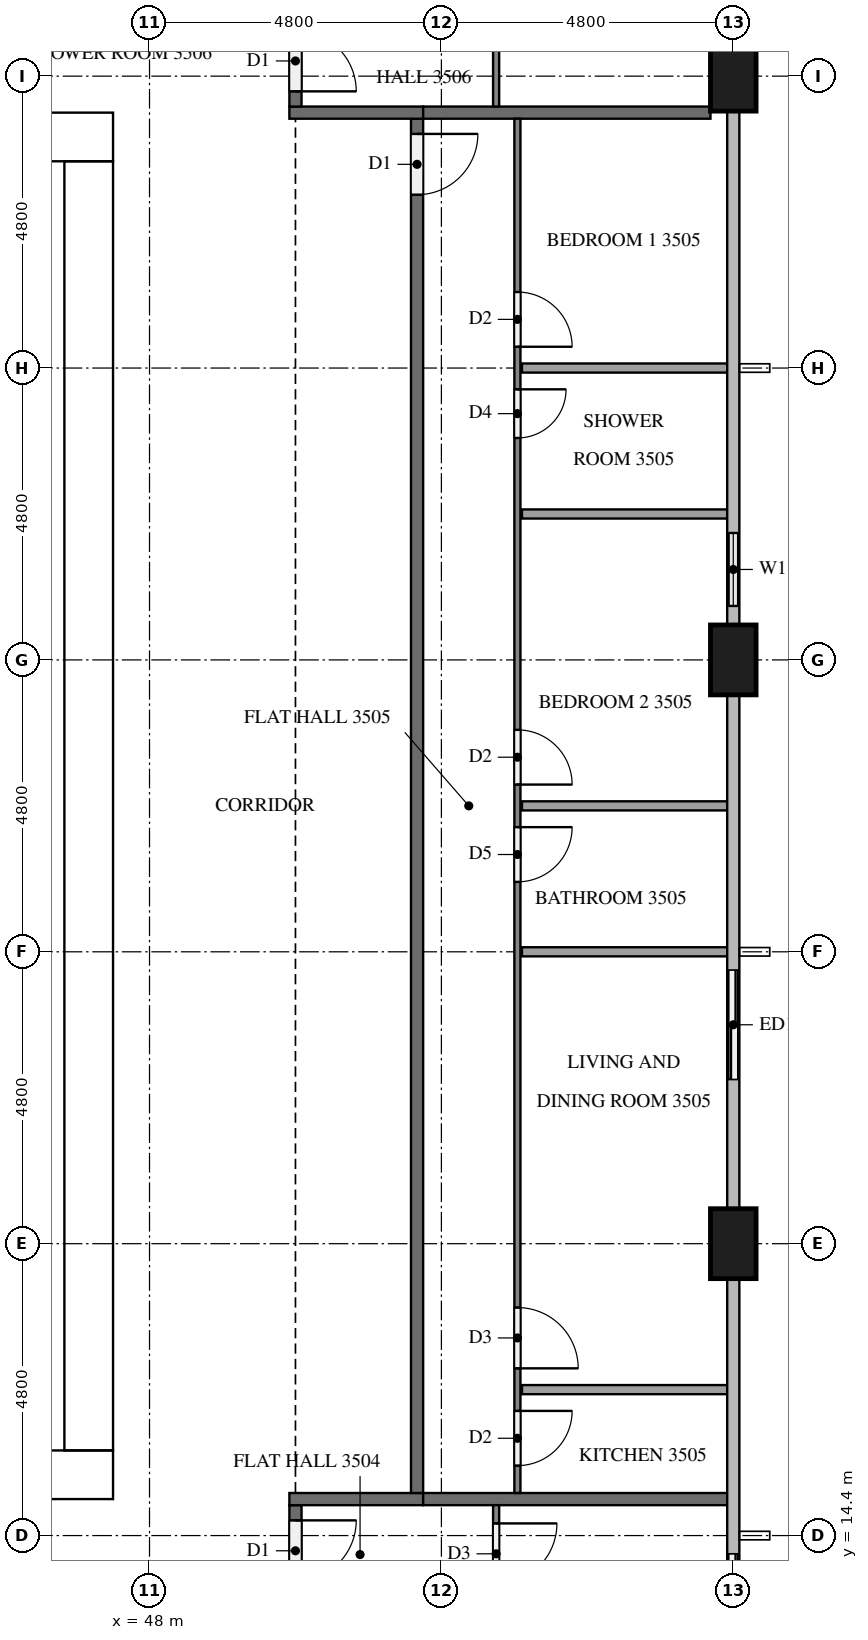
"""IFC4 building model, lengths in metres.
Left out: names, types, materials, properties, quantities, classifications, styles, units other than length and angle.
Written with IfcOpenShell. Run it as: python <this file> out.ifc"""

import sys

from ifc_helpers import new_model, si_unit, direction, frame, frame_2d, origin, origin_2d, place, context, subcontext, project, spatial, rectangle, extrude, element, fill, save


model = new_model("IFC4")
c1 = context("Model", 3, precision=1e-05, world=origin(), true_north=direction((0.0, 1.0)))
c2 = subcontext(c1, "Body", "Model", "MODEL_VIEW")
j1 = project(units=[si_unit("LENGTHUNIT", "METRE"), si_unit("PLANEANGLEUNIT", "RADIAN")], contexts=[c1])
p1 = place(None, origin())
s1 = spatial("IfcSite", under=j1, at=p1, CompositionType="ELEMENT")
p2 = place(p1, origin())
s2 = spatial("IfcBuilding", under=s1, at=p2, CompositionType="ELEMENT")
p3 = place(p2, frame((0.0, 0.0, 136.6)))
s3 = spatial("IfcBuildingStorey", under=s2, at=p3, CompositionType="ELEMENT", Elevation=136.6)
p4 = place(p3, frame((15.0, 15.4, 0.0), z_axis=(0.0, 0.0, 1.0), x_axis=(1.0, 0.0, 0.0)))
e1 = element("IfcWall", 1, at=p4, inside=s3, PredefinedType="SHEAR", context=c2, shape_type="SweptSolid", body=[
    extrude(rectangle(XDim=32.4, YDim=0.8, at=frame_2d((16.2, 0.0))), origin(), (0.0, 0.0, 1.0), 3.2),
])
p5 = place(p4, frame((15.3, 0.0, 0.0)))
e2 = element("IfcOpeningElement", 2, at=p5, cuts=e1, PredefinedType="OPENING", context=c2, shape_type="SweptSolid", body=[
    extrude(rectangle(XDim=1.8, YDim=2.1, at=frame_2d((0.9, 1.05))), frame((0.0, 0.41, 0.0), z_axis=(0.0, -1.0, 0.0), x_axis=(1.0, 0.0, 0.0)), (0.0, 0.0, 1.0), 0.82),
])
p6 = place(p3, frame((15.0, 37.4, 0.0), z_axis=(0.0, 0.0, 1.0), x_axis=(1.0, 0.0, 0.0)))
e3 = element("IfcWall", 3, at=p6, inside=s3, PredefinedType="SHEAR", context=c2, shape_type="SweptSolid", body=[
    extrude(rectangle(XDim=32.4, YDim=0.8, at=frame_2d((16.2, 0.0))), origin(), (0.0, 0.0, 1.0), 3.2),
])
p7 = place(p6, frame((15.3, 0.0, 0.0)))
e4 = element("IfcOpeningElement", 4, at=p7, cuts=e3, PredefinedType="OPENING", context=c2, shape_type="SweptSolid", body=[
    extrude(rectangle(XDim=1.8, YDim=2.1, at=frame_2d((0.9, 1.05))), frame((0.0, 0.41, 0.0), z_axis=(0.0, -1.0, 0.0), x_axis=(1.0, 0.0, 0.0)), (0.0, 0.0, 1.0), 0.82),
])
p8 = place(p6, frame((1.51, 0.0, 0.0)))
e5 = element("IfcOpeningElement", 5, at=p8, cuts=e3, PredefinedType="OPENING", context=c2, shape_type="SweptSolid", body=[
    extrude(rectangle(XDim=1.0, YDim=2.1, at=frame_2d((0.5, 1.05))), frame((0.0, 0.41, 0.0), z_axis=(0.0, -1.0, 0.0), x_axis=(1.0, 0.0, 0.0)), (0.0, 0.0, 1.0), 0.82),
])
p9 = place(p6, frame((5.11, 0.0, 0.0)))
e6 = element("IfcOpeningElement", 6, at=p9, cuts=e3, PredefinedType="OPENING", context=c2, shape_type="SweptSolid", body=[
    extrude(rectangle(XDim=1.0, YDim=2.1, at=frame_2d((0.5, 1.05))), frame((0.0, 0.41, 0.0), z_axis=(0.0, -1.0, 0.0), x_axis=(1.0, 0.0, 0.0)), (0.0, 0.0, 1.0), 0.82),
])
p10 = place(p3, frame((47.0, 15.8, 0.0), z_axis=(0.0, 0.0, 1.0), x_axis=(0.0, 1.0, 0.0)))
e7 = element("IfcWall", 7, at=p10, inside=s3, PredefinedType="SHEAR", context=c2, shape_type="SweptSolid", body=[
    extrude(rectangle(XDim=21.2, YDim=0.8, at=frame_2d((10.6, 0.0))), origin(), (0.0, 0.0, 1.0), 3.2),
])
p11 = place(p10, frame((10.3, 0.0, 0.0)))
e8 = element("IfcOpeningElement", 8, at=p11, cuts=e7, PredefinedType="OPENING", context=c2, shape_type="SweptSolid", body=[
    extrude(rectangle(XDim=1.2, YDim=2.1, at=frame_2d((0.6, 1.05))), frame((0.0, 0.41, 0.0), z_axis=(0.0, -1.0, 0.0), x_axis=(1.0, 0.0, 0.0)), (0.0, 0.0, 1.0), 0.82),
])
for number, where, z_axis, x_axis in (
    (9, (57.6, 19.2, 0.0), (0.0, 0.0, 1.0), (0.0, 1.0, 0.0)),
    (10, (57.6, 28.8, 0.0), (0.0, 0.0, 1.0), (0.0, 1.0, 0.0)),
    (11, (57.6, 38.4, 0.0), (0.0, 0.0, 1.0), (0.0, 1.0, 0.0)),
):
    element("IfcColumn", number, at=place(p3, frame(where, z_axis=z_axis, x_axis=x_axis)), inside=s3, PredefinedType="COLUMN", context=c2, shape_type="SweptSolid", body=[
        extrude(rectangle(XDim=1.15, YDim=0.75, at=origin_2d()), origin(), (0.0, 0.0, 1.0), 3.2),
    ])
p12 = place(p3, frame((57.6, 12.0, 0.0), z_axis=(0.0, 0.0, 1.0), x_axis=(0.0, 1.0, 0.0)))
e12 = element("IfcWall", 12, at=p12, inside=s3, PredefinedType="SOLIDWALL", context=c2, shape_type="SweptSolid", body=[
    extrude(rectangle(XDim=2.4, YDim=0.15, at=frame_2d((1.2, 0.0))), origin(), (0.0, 0.0, 1.0), 3.2),
])
p13 = place(p12, frame((0.3, 0.0, 0.0)))
e13 = element("IfcOpeningElement", 13, at=p13, cuts=e12, PredefinedType="OPENING", context=c2, shape_type="SweptSolid", body=[
    extrude(rectangle(XDim=1.8, YDim=2.4, at=frame_2d((0.9, 1.2))), frame((0.0, 0.085, 0.0), z_axis=(0.0, -1.0, 0.0), x_axis=(1.0, 0.0, 0.0)), (0.0, 0.0, 1.0), 0.17),
])
p14 = place(p3, frame((57.6, 21.6, 0.0), z_axis=(0.0, 0.0, 1.0), x_axis=(0.0, 1.0, 0.0)))
e14 = element("IfcWall", 14, at=p14, inside=s3, PredefinedType="SOLIDWALL", context=c2, shape_type="SweptSolid", body=[
    extrude(rectangle(XDim=2.4, YDim=0.15, at=frame_2d((1.2, 0.0))), origin(), (0.0, 0.0, 1.0), 3.2),
])
p15 = place(p14, frame((0.3, 0.0, 0.0)))
e15 = element("IfcOpeningElement", 15, at=p15, cuts=e14, PredefinedType="OPENING", context=c2, shape_type="SweptSolid", body=[
    extrude(rectangle(XDim=1.8, YDim=2.4, at=frame_2d((0.9, 1.2))), frame((0.0, 0.085, 0.0), z_axis=(0.0, -1.0, 0.0), x_axis=(1.0, 0.0, 0.0)), (0.0, 0.0, 1.0), 0.17),
])
p16 = place(p3, frame((57.6, 29.375, 0.0), z_axis=(0.0, 0.0, 1.0), x_axis=(0.0, 1.0, 0.0)))
e16 = element("IfcWall", 16, at=p16, inside=s3, PredefinedType="SOLIDWALL", context=c2, shape_type="SweptSolid", body=[
    extrude(rectangle(XDim=1.825, YDim=0.15, at=frame_2d((0.913, 0.0))), origin(), (0.0, 0.0, 1.0), 3.2),
])
p17 = place(p16, frame((0.312, 0.0, 0.9)))
e17 = element("IfcOpeningElement", 17, at=p17, cuts=e16, PredefinedType="OPENING", context=c2, shape_type="SweptSolid", body=[
    extrude(rectangle(XDim=1.2, YDim=1.4, at=frame_2d((0.6, 0.7))), frame((0.0, 0.085, 0.0), z_axis=(0.0, -1.0, 0.0), x_axis=(1.0, 0.0, 0.0)), (0.0, 0.0, 1.0), 0.17),
])
p18 = place(p3, frame((50.4, 14.9, 0.0), z_axis=(0.0, 0.0, 1.0), x_axis=(0.0, -1.0, 0.0)))
e18 = element("IfcWall", 18, at=p18, inside=s3, PredefinedType="PARTITIONING", context=c2, shape_type="SweptSolid", body=[
    extrude(rectangle(XDim=2.8, YDim=0.2, at=frame_2d((1.4, 0.0))), origin(), (0.0, 0.0, 1.0), 3.2),
])
p19 = place(p18, frame((0.25, 0.0, 0.0)))
e19 = element("IfcOpeningElement", 19, at=p19, cuts=e18, PredefinedType="OPENING", context=c2, shape_type="SweptSolid", body=[
    extrude(rectangle(XDim=1.0, YDim=2.1, at=frame_2d((0.5, 1.05))), frame((0.0, 0.11, 0.0), z_axis=(0.0, -1.0, 0.0), x_axis=(1.0, 0.0, 0.0)), (0.0, 0.0, 1.0), 0.22),
])
p20 = place(p3, frame((50.3, 15.0, 0.0), z_axis=(0.0, 0.0, 1.0), x_axis=(1.0, 0.0, 0.0)))
e20 = element("IfcWall", 20, at=p20, inside=s3, PredefinedType="PARTITIONING", context=c2, shape_type="SweptSolid", body=[
    extrude(rectangle(XDim=2.2, YDim=0.2, at=frame_2d((1.1, 0.0))), origin(), (0.0, 0.0, 1.0), 3.2),
])
p21 = place(p3, frame((52.4, 37.7, 0.0), z_axis=(0.0, 0.0, 1.0), x_axis=(0.0, -1.0, 0.0)))
e21 = element("IfcWall", 21, at=p21, inside=s3, PredefinedType="PARTITIONING", context=c2, shape_type="SweptSolid", body=[
    extrude(rectangle(XDim=22.6, YDim=0.2, at=frame_2d((11.3, 0.0))), origin(), (0.0, 0.0, 1.0), 3.2),
])
p22 = place(p21, frame((0.25, 0.0, 0.0)))
e22 = element("IfcOpeningElement", 22, at=p22, cuts=e21, PredefinedType="OPENING", context=c2, shape_type="SweptSolid", body=[
    extrude(rectangle(XDim=1.0, YDim=2.1, at=frame_2d((0.5, 1.05))), frame((0.0, 0.11, 0.0), z_axis=(0.0, -1.0, 0.0), x_axis=(1.0, 0.0, 0.0)), (0.0, 0.0, 1.0), 0.22),
])
p23 = place(p3, frame((52.5, 37.8, 0.0), z_axis=(0.0, 0.0, 1.0), x_axis=(-1.0, 0.0, 0.0)))
e23 = element("IfcWall", 23, at=p23, inside=s3, PredefinedType="PARTITIONING", context=c2, shape_type="SweptSolid", body=[
    extrude(rectangle(XDim=2.2, YDim=0.2, at=frame_2d((1.1, 0.0))), origin(), (0.0, 0.0, 1.0), 3.2),
])
p24 = place(p3, frame((50.4, 40.7, 0.0), z_axis=(0.0, 0.0, 1.0), x_axis=(0.0, -1.0, 0.0)))
e24 = element("IfcWall", 24, at=p24, inside=s3, PredefinedType="PARTITIONING", context=c2, shape_type="SweptSolid", body=[
    extrude(rectangle(XDim=2.8, YDim=0.2, at=frame_2d((1.4, 0.0))), origin(), (0.0, 0.0, 1.0), 3.2),
])
p25 = place(p24, frame((1.55, 0.0, 0.0)))
e25 = element("IfcOpeningElement", 25, at=p25, cuts=e24, PredefinedType="OPENING", context=c2, shape_type="SweptSolid", body=[
    extrude(rectangle(XDim=1.0, YDim=2.1, at=frame_2d((0.5, 1.05))), frame((0.0, 0.11, 0.0), z_axis=(0.0, -1.0, 0.0), x_axis=(1.0, 0.0, 0.0)), (0.0, 0.0, 1.0), 0.22),
])
p26 = place(p3, frame((52.5, 15.0, 0.0), z_axis=(0.0, 0.0, 1.0), x_axis=(1.0, 0.0, 0.0)))
e26 = element("IfcWall", 26, at=p26, inside=s3, PredefinedType="PARTITIONING", context=c2, shape_type="SweptSolid", body=[
    extrude(rectangle(XDim=5.0, YDim=0.2, at=frame_2d((2.5, 0.0))), origin(), (0.0, 0.0, 1.0), 3.2),
])
p27 = place(p3, frame((52.5, 37.8, 0.0), z_axis=(0.0, 0.0, 1.0), x_axis=(1.0, 0.0, 0.0)))
e27 = element("IfcWall", 27, at=p27, inside=s3, PredefinedType="PARTITIONING", context=c2, shape_type="SweptSolid", body=[
    extrude(rectangle(XDim=4.725, YDim=0.2, at=frame_2d((2.363, 0.0))), origin(), (0.0, 0.0, 1.0), 3.2),
])
p28 = place(p3, frame((53.7, 14.9, 0.0), z_axis=(0.0, 0.0, 1.0), x_axis=(0.0, -1.0, 0.0)))
e28 = element("IfcWall", 28, at=p28, inside=s3, PredefinedType="PARTITIONING", context=c2, shape_type="SweptSolid", body=[
    extrude(rectangle(XDim=9.759, YDim=0.1, at=frame_2d((4.879, 0.0))), origin(), (0.0, 0.0, 1.0), 3.2),
])
p29 = place(p28, frame((0.3, 0.0, 0.0)))
e29 = element("IfcOpeningElement", 29, at=p29, cuts=e28, PredefinedType="OPENING", context=c2, shape_type="SweptSolid", body=[
    extrude(rectangle(XDim=1.0, YDim=2.1, at=frame_2d((0.5, 1.05))), frame((0.0, 0.06, 0.0), z_axis=(0.0, -1.0, 0.0), x_axis=(1.0, 0.0, 0.0)), (0.0, 0.0, 1.0), 0.12),
])
p30 = place(p28, frame((8.559, 0.0, 0.0)))
e30 = element("IfcOpeningElement", 30, at=p30, cuts=e28, PredefinedType="OPENING", context=c2, shape_type="SweptSolid", body=[
    extrude(rectangle(XDim=0.9, YDim=2.1, at=frame_2d((0.45, 1.05))), frame((0.0, 0.06, 0.0), z_axis=(0.0, -1.0, 0.0), x_axis=(1.0, 0.0, 0.0)), (0.0, 0.0, 1.0), 0.12),
])
for number, where, z_axis, x_axis in (
    (31, (54.125, 33.6, 0.0), (0.0, 0.0, 1.0), (1.0, 0.0, 0.0)),
    (32, (54.125, 31.2, 0.0), (0.0, 0.0, 1.0), (1.0, 0.0, 0.0)),
    (33, (54.125, 26.4, 0.0), (0.0, 0.0, 1.0), (1.0, 0.0, 0.0)),
    (34, (54.125, 24.0, 0.0), (0.0, 0.0, 1.0), (1.0, 0.0, 0.0)),
    (35, (54.125, 16.8, 0.0), (0.0, 0.0, 1.0), (1.0, 0.0, 0.0)),
):
    element("IfcWall", number, at=place(p3, frame(where, z_axis=z_axis, x_axis=x_axis)), inside=s3, PredefinedType="PARTITIONING", context=c2, shape_type="SweptSolid", body=[
        extrude(rectangle(XDim=3.375, YDim=0.15, at=frame_2d((1.688, 0.0))), origin(), (0.0, 0.0, 1.0), 3.2),
    ])
p31 = place(p3, frame((54.05, 37.7, 0.0), z_axis=(0.0, 0.0, 1.0), x_axis=(0.0, -1.0, 0.0)))
e36 = element("IfcWall", 36, at=p31, inside=s3, PredefinedType="PARTITIONING", context=c2, shape_type="SweptSolid", body=[
    extrude(rectangle(XDim=22.6, YDim=0.1, at=frame_2d((11.3, 0.0))), origin(), (0.0, 0.0, 1.0), 3.2),
])
p32 = place(p31, frame((2.85, 0.0, 0.0)))
e37 = element("IfcOpeningElement", 37, at=p32, cuts=e36, PredefinedType="OPENING", context=c2, shape_type="SweptSolid", body=[
    extrude(rectangle(XDim=0.9, YDim=2.1, at=frame_2d((0.45, 1.05))), frame((0.0, 0.06, 0.0), z_axis=(0.0, -1.0, 0.0), x_axis=(1.0, 0.0, 0.0)), (0.0, 0.0, 1.0), 0.12),
])
p33 = place(p31, frame((4.45, 0.0, 0.0)))
e38 = element("IfcOpeningElement", 38, at=p33, cuts=e36, PredefinedType="OPENING", context=c2, shape_type="SweptSolid", body=[
    extrude(rectangle(XDim=0.8, YDim=2.1, at=frame_2d((0.4, 1.05))), frame((0.0, 0.06, 0.0), z_axis=(0.0, -1.0, 0.0), x_axis=(1.0, 0.0, 0.0)), (0.0, 0.0, 1.0), 0.12),
])
p34 = place(p31, frame((10.05, 0.0, 0.0)))
e39 = element("IfcOpeningElement", 39, at=p34, cuts=e36, PredefinedType="OPENING", context=c2, shape_type="SweptSolid", body=[
    extrude(rectangle(XDim=0.9, YDim=2.1, at=frame_2d((0.45, 1.05))), frame((0.0, 0.06, 0.0), z_axis=(0.0, -1.0, 0.0), x_axis=(1.0, 0.0, 0.0)), (0.0, 0.0, 1.0), 0.12),
])
p35 = place(p31, frame((11.65, 0.0, 0.0)))
e40 = element("IfcOpeningElement", 40, at=p35, cuts=e36, PredefinedType="OPENING", context=c2, shape_type="SweptSolid", body=[
    extrude(rectangle(XDim=0.9, YDim=2.1, at=frame_2d((0.45, 1.05))), frame((0.0, 0.06, 0.0), z_axis=(0.0, -1.0, 0.0), x_axis=(1.0, 0.0, 0.0)), (0.0, 0.0, 1.0), 0.12),
])
p36 = place(p31, frame((19.55, 0.0, 0.0)))
e41 = element("IfcOpeningElement", 41, at=p36, cuts=e36, PredefinedType="OPENING", context=c2, shape_type="SweptSolid", body=[
    extrude(rectangle(XDim=1.0, YDim=2.1, at=frame_2d((0.5, 1.05))), frame((0.0, 0.06, 0.0), z_axis=(0.0, -1.0, 0.0), x_axis=(1.0, 0.0, 0.0)), (0.0, 0.0, 1.0), 0.12),
])
p37 = place(p31, frame((21.25, 0.0, 0.0)))
e42 = element("IfcOpeningElement", 42, at=p37, cuts=e36, PredefinedType="OPENING", context=c2, shape_type="SweptSolid", body=[
    extrude(rectangle(XDim=0.9, YDim=2.1, at=frame_2d((0.45, 1.05))), frame((0.0, 0.06, 0.0), z_axis=(0.0, -1.0, 0.0), x_axis=(1.0, 0.0, 0.0)), (0.0, 0.0, 1.0), 0.12),
])
p38 = place(p3, frame((53.7, 52.459, 0.0), z_axis=(0.0, 0.0, 1.0), x_axis=(0.0, -1.0, 0.0)))
e43 = element("IfcWall", 43, at=p38, inside=s3, PredefinedType="PARTITIONING", context=c2, shape_type="SweptSolid", body=[
    extrude(rectangle(XDim=14.559, YDim=0.1, at=frame_2d((7.279, 0.0))), origin(), (0.0, 0.0, 1.0), 3.2),
])
p39 = place(p38, frame((9.609, 0.0, 0.0)))
e44 = element("IfcOpeningElement", 44, at=p39, cuts=e43, PredefinedType="OPENING", context=c2, shape_type="SweptSolid", body=[
    extrude(rectangle(XDim=0.9, YDim=2.1, at=frame_2d((0.45, 1.05))), frame((0.0, 0.06, 0.0), z_axis=(0.0, -1.0, 0.0), x_axis=(1.0, 0.0, 0.0)), (0.0, 0.0, 1.0), 0.12),
])
p40 = place(p38, frame((7.909, 0.0, 0.0)))
e45 = element("IfcOpeningElement", 45, at=p40, cuts=e43, PredefinedType="OPENING", context=c2, shape_type="SweptSolid", body=[
    extrude(rectangle(XDim=1.0, YDim=2.1, at=frame_2d((0.5, 1.05))), frame((0.0, 0.06, 0.0), z_axis=(0.0, -1.0, 0.0), x_axis=(1.0, 0.0, 0.0)), (0.0, 0.0, 1.0), 0.12),
])
p41 = place(p38, frame((0.3, 0.0, 0.0)))
e46 = element("IfcOpeningElement", 46, at=p41, cuts=e43, PredefinedType="OPENING", context=c2, shape_type="SweptSolid", body=[
    extrude(rectangle(XDim=0.9, YDim=2.1, at=frame_2d((0.45, 1.05))), frame((0.0, 0.06, 0.0), z_axis=(0.0, -1.0, 0.0), x_axis=(1.0, 0.0, 0.0)), (0.0, 0.0, 1.0), 0.12),
])
p42 = place(p13, origin())
e47 = element("IfcDoor", 47, at=p42, inside=s3, OperationType="SLIDING_TO_RIGHT", PredefinedType="DOOR", context=c2, shape_type="SweptSolid", body=[
    extrude(rectangle(XDim=1.8, YDim=2.4, at=frame_2d((0.9, 1.2))), frame((0.0, 0.025, 0.0), z_axis=(0.0, -1.0, 0.0), x_axis=(1.0, 0.0, 0.0)), (0.0, 0.0, 1.0), 0.05),
])
fill(e13, e47)
p43 = place(p15, origin())
e48 = element("IfcDoor", 48, at=p43, inside=s3, OperationType="SLIDING_TO_LEFT", PredefinedType="DOOR", context=c2, shape_type="SweptSolid", body=[
    extrude(rectangle(XDim=1.8, YDim=2.4, at=frame_2d((0.9, 1.2))), frame((0.0, 0.025, 0.0), z_axis=(0.0, -1.0, 0.0), x_axis=(1.0, 0.0, 0.0)), (0.0, 0.0, 1.0), 0.05),
])
fill(e15, e48)
p44 = place(p17, origin())
e49 = element("IfcWindow", 49, at=p44, inside=s3, PartitioningType="SINGLE_PANEL", PredefinedType="WINDOW", context=c2, shape_type="SweptSolid", body=[
    extrude(rectangle(XDim=1.2, YDim=1.4, at=frame_2d((0.6, 0.7))), frame((0.0, 0.03, 0.0), z_axis=(0.0, -1.0, 0.0), x_axis=(1.0, 0.0, 0.0)), (0.0, 0.0, 1.0), 0.06),
])
fill(e17, e49)
p45 = place(p11, origin())
e50 = element("IfcDoor", 50, at=p45, inside=s3, OperationType="SINGLE_SWING_LEFT", PredefinedType="DOOR", context=c2, shape_type="SweptSolid", body=[
    extrude(rectangle(XDim=1.2, YDim=2.1, at=frame_2d((0.6, 1.05))), frame((0.0, 0.025, 0.0), z_axis=(0.0, -1.0, 0.0), x_axis=(1.0, 0.0, 0.0)), (0.0, 0.0, 1.0), 0.05),
])
fill(e8, e50)
p46 = place(p19, origin())
e51 = element("IfcDoor", 51, at=p46, inside=s3, OperationType="SINGLE_SWING_LEFT", PredefinedType="DOOR", context=c2, shape_type="SweptSolid", body=[
    extrude(rectangle(XDim=1.0, YDim=2.1, at=frame_2d((0.5, 1.05))), frame((0.0, 0.025, 0.0), z_axis=(0.0, -1.0, 0.0), x_axis=(1.0, 0.0, 0.0)), (0.0, 0.0, 1.0), 0.05),
])
fill(e19, e51)
p47 = place(p22, origin())
e52 = element("IfcDoor", 52, at=p47, inside=s3, OperationType="SINGLE_SWING_LEFT", PredefinedType="DOOR", context=c2, shape_type="SweptSolid", body=[
    extrude(rectangle(XDim=1.0, YDim=2.1, at=frame_2d((0.5, 1.05))), frame((0.0, 0.025, 0.0), z_axis=(0.0, -1.0, 0.0), x_axis=(1.0, 0.0, 0.0)), (0.0, 0.0, 1.0), 0.05),
])
fill(e22, e52)
p48 = place(p25, origin())
e53 = element("IfcDoor", 53, at=p48, inside=s3, OperationType="SINGLE_SWING_RIGHT", PredefinedType="DOOR", context=c2, shape_type="SweptSolid", body=[
    extrude(rectangle(XDim=1.0, YDim=2.1, at=frame_2d((0.5, 1.05))), frame((0.0, 0.025, 0.0), z_axis=(0.0, -1.0, 0.0), x_axis=(1.0, 0.0, 0.0)), (0.0, 0.0, 1.0), 0.05),
])
fill(e25, e53)
p49 = place(p29, origin())
e54 = element("IfcDoor", 54, at=p49, inside=s3, OperationType="SINGLE_SWING_LEFT", PredefinedType="DOOR", context=c2, shape_type="SweptSolid", body=[
    extrude(rectangle(XDim=1.0, YDim=2.1, at=frame_2d((0.5, 1.05))), frame((0.0, 0.025, 0.0), z_axis=(0.0, -1.0, 0.0), x_axis=(1.0, 0.0, 0.0)), (0.0, 0.0, 1.0), 0.05),
])
fill(e29, e54)
p50 = place(p32, origin())
e55 = element("IfcDoor", 55, at=p50, inside=s3, OperationType="SINGLE_SWING_RIGHT", PredefinedType="DOOR", context=c2, shape_type="SweptSolid", body=[
    extrude(rectangle(XDim=0.9, YDim=2.1, at=frame_2d((0.45, 1.05))), frame((0.0, 0.025, 0.0), z_axis=(0.0, -1.0, 0.0), x_axis=(1.0, 0.0, 0.0)), (0.0, 0.0, 1.0), 0.05),
])
fill(e37, e55)
p51 = place(p33, origin())
e56 = element("IfcDoor", 56, at=p51, inside=s3, OperationType="SINGLE_SWING_LEFT", PredefinedType="DOOR", context=c2, shape_type="SweptSolid", body=[
    extrude(rectangle(XDim=0.8, YDim=2.1, at=frame_2d((0.4, 1.05))), frame((0.0, 0.025, 0.0), z_axis=(0.0, -1.0, 0.0), x_axis=(1.0, 0.0, 0.0)), (0.0, 0.0, 1.0), 0.05),
])
fill(e38, e56)
p52 = place(p34, origin())
e57 = element("IfcDoor", 57, at=p52, inside=s3, OperationType="SINGLE_SWING_RIGHT", PredefinedType="DOOR", context=c2, shape_type="SweptSolid", body=[
    extrude(rectangle(XDim=0.9, YDim=2.1, at=frame_2d((0.45, 1.05))), frame((0.0, 0.025, 0.0), z_axis=(0.0, -1.0, 0.0), x_axis=(1.0, 0.0, 0.0)), (0.0, 0.0, 1.0), 0.05),
])
fill(e39, e57)
p53 = place(p35, origin())
e58 = element("IfcDoor", 58, at=p53, inside=s3, OperationType="SINGLE_SWING_LEFT", PredefinedType="DOOR", context=c2, shape_type="SweptSolid", body=[
    extrude(rectangle(XDim=0.9, YDim=2.1, at=frame_2d((0.45, 1.05))), frame((0.0, 0.025, 0.0), z_axis=(0.0, -1.0, 0.0), x_axis=(1.0, 0.0, 0.0)), (0.0, 0.0, 1.0), 0.05),
])
fill(e40, e58)
p54 = place(p36, origin())
e59 = element("IfcDoor", 59, at=p54, inside=s3, OperationType="SINGLE_SWING_RIGHT", PredefinedType="DOOR", context=c2, shape_type="SweptSolid", body=[
    extrude(rectangle(XDim=1.0, YDim=2.1, at=frame_2d((0.5, 1.05))), frame((0.0, 0.025, 0.0), z_axis=(0.0, -1.0, 0.0), x_axis=(1.0, 0.0, 0.0)), (0.0, 0.0, 1.0), 0.05),
])
fill(e41, e59)
p55 = place(p37, origin())
e60 = element("IfcDoor", 60, at=p55, inside=s3, OperationType="SINGLE_SWING_LEFT", PredefinedType="DOOR", context=c2, shape_type="SweptSolid", body=[
    extrude(rectangle(XDim=0.9, YDim=2.1, at=frame_2d((0.45, 1.05))), frame((0.0, 0.025, 0.0), z_axis=(0.0, -1.0, 0.0), x_axis=(1.0, 0.0, 0.0)), (0.0, 0.0, 1.0), 0.05),
])
fill(e42, e60)
save(model, sys.argv[1])
